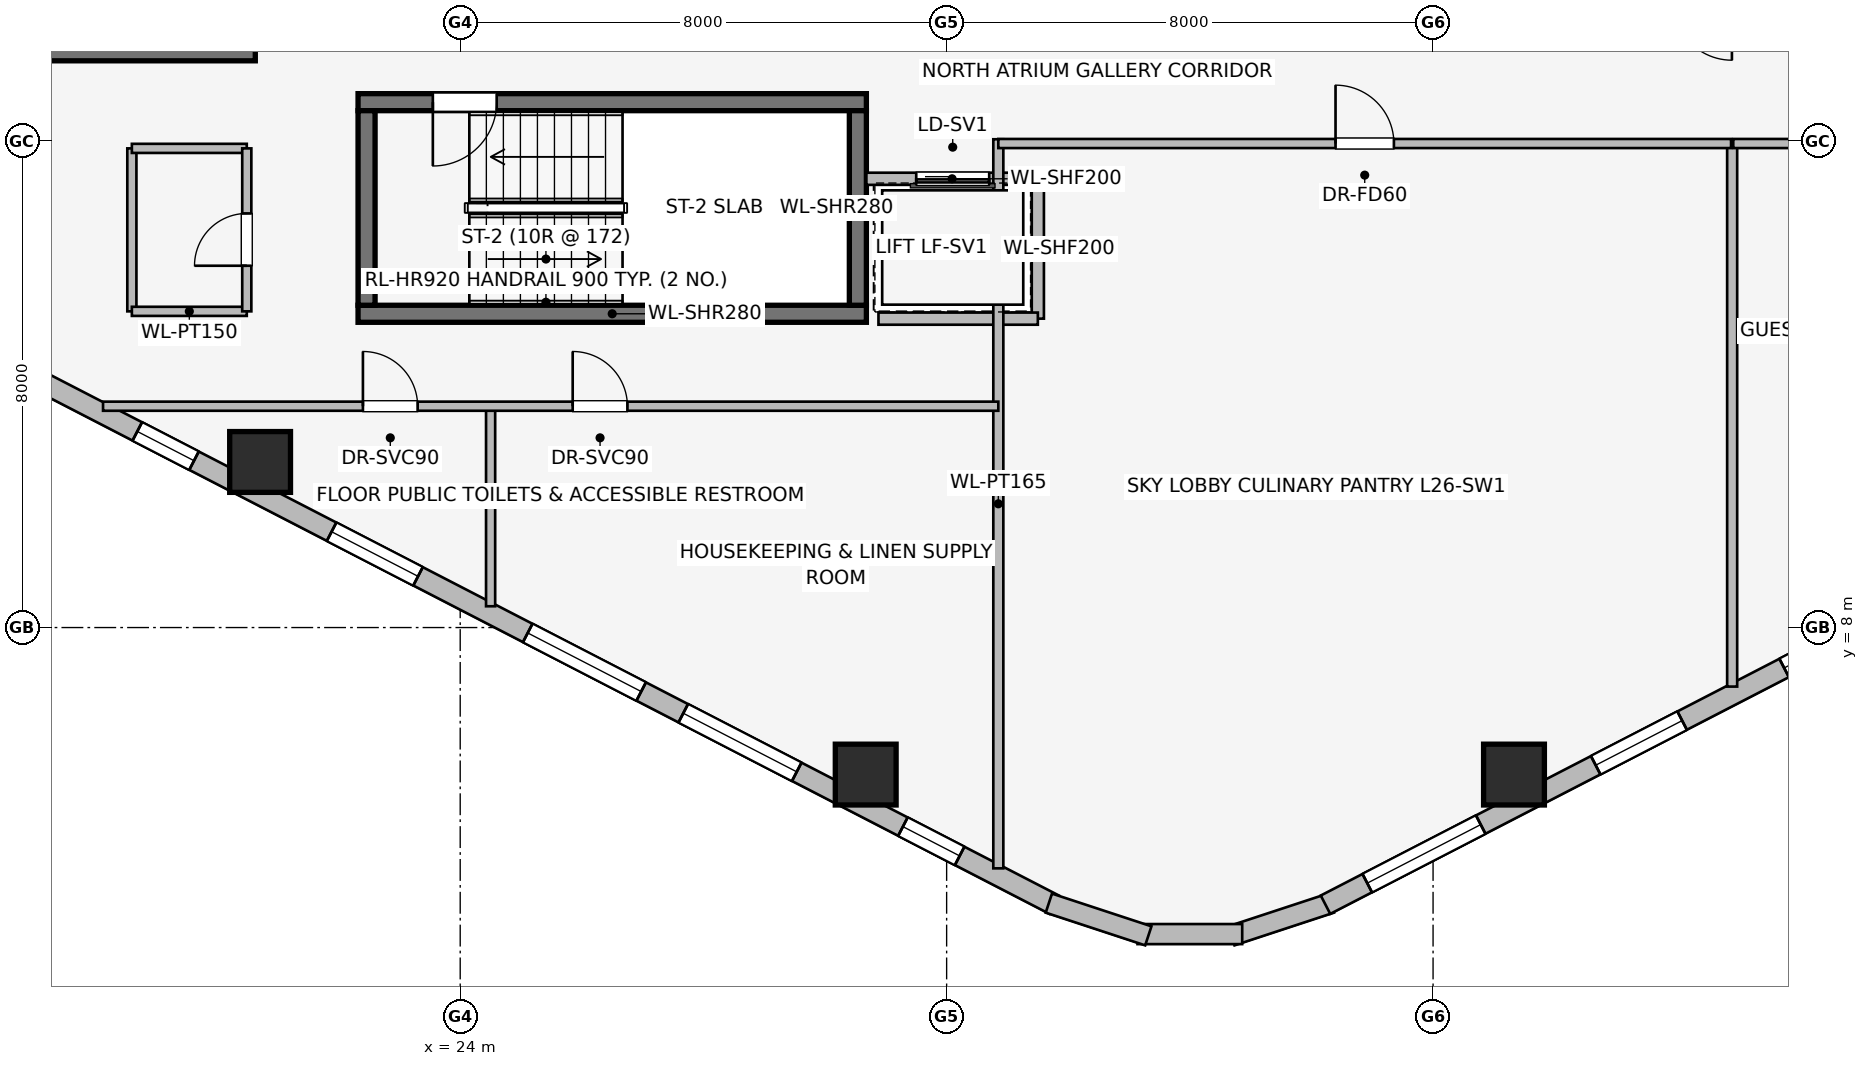
"""IFC4 building model, lengths in metres.
Left out: names, types, materials, properties, quantities, classifications, styles, units other than length and angle.
Written with IfcOpenShell. Run it as: python <this file> out.ifc"""

import sys

from ifc_helpers import new_model, si_unit, direction, frame, frame_2d, origin, origin_2d, place, context, subcontext, project, spatial, rectangle, extrude, element, fill, save


model = new_model("IFC4")
c1 = context("Model", 3, precision=1e-05, world=origin(), true_north=direction((0.0, 1.0)))
c2 = subcontext(c1, "Body", "Model", "MODEL_VIEW")
j1 = project(units=[si_unit("LENGTHUNIT", "METRE"), si_unit("PLANEANGLEUNIT", "RADIAN")], contexts=[c1])
p1 = place(None, origin())
s1 = spatial("IfcSite", under=j1, at=p1, CompositionType="ELEMENT")
p2 = place(p1, origin())
s2 = spatial("IfcBuilding", under=s1, at=p2, CompositionType="ELEMENT")
p3 = place(p2, frame((0.0, 0.0, 101.55)))
s3 = spatial("IfcBuildingStorey", under=s2, at=p3, CompositionType="ELEMENT", Elevation=101.55)
p4 = place(p3, frame((16.87, 17.46, 0.0), z_axis=(0.0, 0.0, 1.0), x_axis=(1.0, 0.0, 0.0)))
e1 = element("IfcWall", 1, at=p4, inside=s3, PredefinedType="SHEAR", context=c2, shape_type="SweptSolid", body=[
    extrude(rectangle(XDim=3.76, YDim=0.28, at=frame_2d((1.88, 0.0))), origin(), (0.0, 0.0, 1.0), 3.45),
])
p5 = place(p3, frame((22.32, 13.16, 0.0), z_axis=(0.0, 0.0, 1.0), x_axis=(1.0, 0.0, 0.0)))
e2 = element("IfcWall", 2, at=p5, inside=s3, PredefinedType="SHEAR", context=c2, shape_type="SweptSolid", body=[
    extrude(rectangle(XDim=8.36, YDim=0.28, at=frame_2d((4.18, 0.0))), origin(), (0.0, 0.0, 1.0), 3.45),
])
p6 = place(p3, frame((30.68, 16.64, 0.0), z_axis=(0.0, 0.0, 1.0), x_axis=(-1.0, 0.0, 0.0)))
e3 = element("IfcWall", 3, at=p6, inside=s3, PredefinedType="SHEAR", context=c2, shape_type="SweptSolid", body=[
    extrude(rectangle(XDim=8.36, YDim=0.28, at=frame_2d((4.18, 0.0))), origin(), (0.0, 0.0, 1.0), 3.45),
])
p7 = place(p6, frame((6.08, 0.0, 0.0)))
e4 = element("IfcOpeningElement", 4, at=p7, cuts=e3, PredefinedType="OPENING", context=c2, shape_type="SweptSolid", body=[
    extrude(rectangle(XDim=1.05, YDim=2.0, at=frame_2d((0.525, 1.0))), frame((0.0, 0.15, 0.0), z_axis=(0.0, -1.0, 0.0), x_axis=(1.0, 0.0, 0.0)), (0.0, 0.0, 1.0), 0.3),
])
for number, where, z_axis, x_axis in (
    (5, (22.46, 16.5, 0.0), (0.0, 0.0, 1.0), (0.0, -1.0, 0.0)),
    (6, (30.54, 13.3, 0.0), (0.0, 0.0, 1.0), (0.0, 1.0, 0.0)),
):
    element("IfcWall", number, at=place(p3, frame(where, z_axis=z_axis, x_axis=x_axis)), inside=s3, PredefinedType="SHEAR", context=c2, shape_type="SweptSolid", body=[
        extrude(rectangle(XDim=3.2, YDim=0.28, at=frame_2d((1.6, 0.0))), origin(), (0.0, 0.0, 1.0), 3.45),
    ])
for number, where, z_axis, x_axis in (
    (7, (20.709, 10.723, 0.0), (0.0, 0.0, 1.0), (1.0, 0.0, 0.0)),
    (8, (30.669, 5.582, 0.0), (0.0, 0.0, 1.0), (1.0, 0.0, 0.0)),
    (9, (41.331, 5.582, 0.0), (0.0, 0.0, 1.0), (1.0, 0.0, 0.0)),
):
    element("IfcColumn", number, at=place(p3, frame(where, z_axis=z_axis, x_axis=x_axis)), inside=s3, PredefinedType="COLUMN", context=c2, shape_type="SweptSolid", body=[
        extrude(rectangle(XDim=1.0, YDim=1.0, at=origin_2d()), origin(), (0.0, 0.0, 1.0), 3.45),
    ])
p8 = place(p3, frame((17.243, 11.95, 0.0), z_axis=(0.0, 0.0, 1.0), x_axis=(-0.790621329885, 0.612305408053, 0.0)))
e10 = element("IfcWall", 10, at=p8, inside=s3, PredefinedType="STANDARD", context=c2, shape_type="SweptSolid", body=[
    extrude(rectangle(XDim=1.676, YDim=0.33, at=frame_2d((0.838, 0.0))), origin(), (0.0, 0.0, 1.0), 3.19),
])
p9 = place(p3, frame((33.769, 3.442, 0.0), z_axis=(0.0, 0.0, 1.0), x_axis=(-0.888613612362, 0.458656568606, 0.0)))
e11 = element("IfcWall", 11, at=p9, inside=s3, PredefinedType="STANDARD", context=c2, shape_type="SweptSolid", body=[
    extrude(rectangle(XDim=18.681, YDim=0.34, at=frame_2d((9.34, 0.0))), origin(), (0.0, 0.0, 1.0), 3.19),
])
p10 = place(p9, frame((1.75, 0.0, 0.75)))
e12 = element("IfcOpeningElement", 12, at=p10, cuts=e11, PredefinedType="OPENING", context=c2, shape_type="SweptSolid", body=[
    extrude(rectangle(XDim=1.05, YDim=1.4, at=frame_2d((0.525, 0.7))), frame((0.0, 0.18, 0.0), z_axis=(0.0, -1.0, 0.0), x_axis=(1.0, 0.0, 0.0)), (0.0, 0.0, 1.0), 0.36),
])
p11 = place(p9, frame((4.765, 0.0, 0.75)))
e13 = element("IfcOpeningElement", 13, at=p11, cuts=e11, PredefinedType="OPENING", context=c2, shape_type="SweptSolid", body=[
    extrude(rectangle(XDim=2.1, YDim=1.5, at=frame_2d((1.05, 0.75))), frame((0.0, 0.18, 0.0), z_axis=(0.0, -1.0, 0.0), x_axis=(1.0, 0.0, 0.0)), (0.0, 0.0, 1.0), 0.36),
])
p12 = place(p9, frame((7.644, 0.0, 0.75)))
e14 = element("IfcOpeningElement", 14, at=p12, cuts=e11, PredefinedType="OPENING", context=c2, shape_type="SweptSolid", body=[
    extrude(rectangle(XDim=2.1, YDim=1.5, at=frame_2d((1.05, 0.75))), frame((0.0, 0.18, 0.0), z_axis=(0.0, -1.0, 0.0), x_axis=(1.0, 0.0, 0.0)), (0.0, 0.0, 1.0), 0.36),
])
p13 = place(p9, frame((11.774, 0.0, 0.75)))
e15 = element("IfcOpeningElement", 15, at=p13, cuts=e11, PredefinedType="OPENING", context=c2, shape_type="SweptSolid", body=[
    extrude(rectangle(XDim=1.6, YDim=1.55, at=frame_2d((0.8, 0.775))), frame((0.0, 0.18, 0.0), z_axis=(0.0, -1.0, 0.0), x_axis=(1.0, 0.0, 0.0)), (0.0, 0.0, 1.0), 0.36),
])
p14 = place(p9, frame((15.92, 0.0, 0.75)))
e16 = element("IfcOpeningElement", 16, at=p14, cuts=e11, PredefinedType="OPENING", context=c2, shape_type="SweptSolid", body=[
    extrude(rectangle(XDim=1.05, YDim=1.4, at=frame_2d((0.525, 0.7))), frame((0.0, 0.18, 0.0), z_axis=(0.0, -1.0, 0.0), x_axis=(1.0, 0.0, 0.0)), (0.0, 0.0, 1.0), 0.36),
])
for number, where, z_axis, x_axis in (
    (17, (38.319, 3.468, 0.0), (0.0, 0.0, 1.0), (-0.95, -0.312, 0.0)),
    (18, (36.861, 2.959, 0.0), (0.0, 0.0, 1.0), (-1.0, 0.0, 0.0)),
    (19, (35.317, 2.93, 0.0), (0.0, 0.0, 1.0), (-0.95, 0.312, 0.0)),
):
    element("IfcWall", number, at=place(p3, frame(where, z_axis=z_axis, x_axis=x_axis)), inside=s3, PredefinedType="STANDARD", context=c2, shape_type="SweptSolid", body=[
        extrude(rectangle(XDim=1.722, YDim=0.33, at=frame_2d((0.861, 0.0))), origin(), (0.0, 0.0, 1.0), 3.19),
    ])
p15 = place(p3, frame((54.831, 12.01, 0.0), z_axis=(0.0, 0.0, 1.0), x_axis=(-0.888613612362, -0.458656568606, 0.0)))
e20 = element("IfcWall", 20, at=p15, inside=s3, PredefinedType="STANDARD", context=c2, shape_type="SweptSolid", body=[
    extrude(rectangle(XDim=18.681, YDim=0.34, at=frame_2d((9.34, 0.0))), origin(), (0.0, 0.0, 1.0), 3.19),
])
p16 = place(p15, frame((1.023, 0.0, 0.75)))
e21 = element("IfcOpeningElement", 21, at=p16, cuts=e20, PredefinedType="OPENING", context=c2, shape_type="SweptSolid", body=[
    extrude(rectangle(XDim=1.6, YDim=1.55, at=frame_2d((0.8, 0.775))), frame((0.0, 0.18, 0.0), z_axis=(0.0, -1.0, 0.0), x_axis=(1.0, 0.0, 0.0)), (0.0, 0.0, 1.0), 0.36),
])
p17 = place(p15, frame((4.914, 0.0, 0.75)))
e22 = element("IfcOpeningElement", 22, at=p17, cuts=e20, PredefinedType="OPENING", context=c2, shape_type="SweptSolid", body=[
    extrude(rectangle(XDim=2.1, YDim=1.5, at=frame_2d((1.05, 0.75))), frame((0.0, 0.18, 0.0), z_axis=(0.0, -1.0, 0.0), x_axis=(1.0, 0.0, 0.0)), (0.0, 0.0, 1.0), 0.36),
])
p18 = place(p15, frame((8.092, 0.0, 0.75)))
e23 = element("IfcOpeningElement", 23, at=p18, cuts=e20, PredefinedType="OPENING", context=c2, shape_type="SweptSolid", body=[
    extrude(rectangle(XDim=2.1, YDim=1.5, at=frame_2d((1.05, 0.75))), frame((0.0, 0.18, 0.0), z_axis=(0.0, -1.0, 0.0), x_axis=(1.0, 0.0, 0.0)), (0.0, 0.0, 1.0), 0.36),
])
p19 = place(p15, frame((12.08, 0.0, 0.75)))
e24 = element("IfcOpeningElement", 24, at=p19, cuts=e20, PredefinedType="OPENING", context=c2, shape_type="SweptSolid", body=[
    extrude(rectangle(XDim=1.6, YDim=1.55, at=frame_2d((0.8, 0.775))), frame((0.0, 0.18, 0.0), z_axis=(0.0, -1.0, 0.0), x_axis=(1.0, 0.0, 0.0)), (0.0, 0.0, 1.0), 0.36),
])
p20 = place(p15, frame((15.808, 0.0, 0.75)))
e25 = element("IfcOpeningElement", 25, at=p20, cuts=e20, PredefinedType="OPENING", context=c2, shape_type="SweptSolid", body=[
    extrude(rectangle(XDim=2.1, YDim=1.5, at=frame_2d((1.05, 0.75))), frame((0.0, 0.18, 0.0), z_axis=(0.0, -1.0, 0.0), x_axis=(1.0, 0.0, 0.0)), (0.0, 0.0, 1.0), 0.36),
])
p21 = place(p3, frame((33.5, 15.38, 0.0), z_axis=(0.0, 0.0, 1.0), x_axis=(-1.0, 0.0, 0.0)))
e26 = element("IfcWall", 26, at=p21, inside=s3, PredefinedType="PARTITIONING", context=c2, shape_type="SweptSolid", body=[
    extrude(rectangle(XDim=2.82, YDim=0.2, at=frame_2d((1.41, 0.0))), origin(), (0.0, 0.0, 1.0), 3.19),
])
p22 = place(p21, frame((0.8, 0.0, 0.0)))
e27 = element("IfcOpeningElement", 27, at=p22, cuts=e26, PredefinedType="OPENING", context=c2, shape_type="SweptSolid", body=[
    extrude(rectangle(XDim=1.2, YDim=2.2, at=frame_2d((0.6, 1.1))), frame((0.0, 0.11, 0.0), z_axis=(0.0, -1.0, 0.0), x_axis=(1.0, 0.0, 0.0)), (0.0, 0.0, 1.0), 0.22),
])
p23 = place(p3, frame((33.5, 13.08, 0.0), z_axis=(0.0, 0.0, 1.0), x_axis=(0.0, 1.0, 0.0)))
e28 = element("IfcWall", 28, at=p23, inside=s3, PredefinedType="PARTITIONING", context=c2, shape_type="SweptSolid", body=[
    extrude(rectangle(XDim=2.3, YDim=0.2, at=frame_2d((1.15, 0.0))), origin(), (0.0, 0.0, 1.0), 3.19),
])
p24 = place(p3, frame((30.879, 13.08, 0.0), z_axis=(0.0, 0.0, 1.0), x_axis=(1.0, 0.0, 0.0)))
e29 = element("IfcWall", 29, at=p24, inside=s3, PredefinedType="PARTITIONING", context=c2, shape_type="SweptSolid", body=[
    extrude(rectangle(XDim=2.621, YDim=0.2, at=frame_2d((1.311, 0.0))), origin(), (0.0, 0.0, 1.0), 3.19),
])
p25 = place(p3, frame((18.6, 15.88, 0.0), z_axis=(0.0, 0.0, 1.0), x_axis=(0.0, -1.0, 0.0)))
e30 = element("IfcWall", 30, at=p25, inside=s3, PredefinedType="PARTITIONING", context=c2, shape_type="SweptSolid", body=[
    extrude(rectangle(XDim=2.68, YDim=0.15, at=frame_2d((1.34, 0.0))), origin(), (0.0, 0.0, 1.0), 3.19),
])
for number, where, z_axis, x_axis in (
    (31, (18.6, 13.2, 0.0), (0.0, 0.0, 1.0), (1.0, 0.0, 0.0)),
    (32, (18.6, 15.88, 0.0), (0.0, 0.0, 1.0), (1.0, 0.0, 0.0)),
):
    element("IfcWall", number, at=place(p3, frame(where, z_axis=z_axis, x_axis=x_axis)), inside=s3, PredefinedType="PARTITIONING", context=c2, shape_type="SweptSolid", body=[
        extrude(rectangle(XDim=1.89, YDim=0.15, at=frame_2d((0.945, 0.0))), origin(), (0.0, 0.0, 1.0), 3.19),
    ])
p26 = place(p3, frame((20.49, 13.2, 0.0), z_axis=(0.0, 0.0, 1.0), x_axis=(0.0, 1.0, 0.0)))
e33 = element("IfcWall", 33, at=p26, inside=s3, PredefinedType="PARTITIONING", context=c2, shape_type="SweptSolid", body=[
    extrude(rectangle(XDim=2.68, YDim=0.15, at=frame_2d((1.34, 0.0))), origin(), (0.0, 0.0, 1.0), 3.19),
])
p27 = place(p26, frame((0.75, 0.0, 0.0)))
e34 = element("IfcOpeningElement", 34, at=p27, cuts=e33, PredefinedType="OPENING", context=c2, shape_type="SweptSolid", body=[
    extrude(rectangle(XDim=0.86, YDim=2.0, at=frame_2d((0.43, 1.0))), frame((0.0, 0.085, 0.0), z_axis=(0.0, -1.0, 0.0), x_axis=(1.0, 0.0, 0.0)), (0.0, 0.0, 1.0), 0.17),
])
p28 = place(p3, frame((32.85, 4.04, 0.0), z_axis=(0.0, 0.0, 1.0), x_axis=(0.0, 1.0, 0.0)))
e35 = element("IfcWall", 35, at=p28, inside=s3, PredefinedType="PARTITIONING", context=c2, shape_type="SweptSolid", body=[
    extrude(rectangle(XDim=11.99, YDim=0.165, at=frame_2d((5.995, 0.0))), origin(), (0.0, 0.0, 1.0), 3.19),
])
p29 = place(p3, frame((24.5, 8.35, 0.0), z_axis=(0.0, 0.0, 1.0), x_axis=(0.0, 1.0, 0.0)))
e36 = element("IfcWall", 36, at=p29, inside=s3, PredefinedType="PARTITIONING", context=c2, shape_type="SweptSolid", body=[
    extrude(rectangle(XDim=3.29, YDim=0.15, at=frame_2d((1.645, 0.0))), origin(), (0.0, 0.0, 1.0), 3.19),
])
p30 = place(p3, frame((18.126, 11.64, 0.0), z_axis=(0.0, 0.0, 1.0), x_axis=(1.0, 0.0, 0.0)))
e37 = element("IfcWall", 37, at=p30, inside=s3, PredefinedType="PARTITIONING", context=c2, shape_type="SweptSolid", body=[
    extrude(rectangle(XDim=14.724, YDim=0.15, at=frame_2d((7.362, 0.0))), origin(), (0.0, 0.0, 1.0), 3.19),
])
p31 = place(p30, frame((4.274, 0.0, 0.0)))
e38 = element("IfcOpeningElement", 38, at=p31, cuts=e37, PredefinedType="OPENING", context=c2, shape_type="SweptSolid", body=[
    extrude(rectangle(XDim=0.9, YDim=2.0, at=frame_2d((0.45, 1.0))), frame((0.0, 0.085, 0.0), z_axis=(0.0, -1.0, 0.0), x_axis=(1.0, 0.0, 0.0)), (0.0, 0.0, 1.0), 0.17),
])
p32 = place(p30, frame((7.724, 0.0, 0.0)))
e39 = element("IfcOpeningElement", 39, at=p32, cuts=e37, PredefinedType="OPENING", context=c2, shape_type="SweptSolid", body=[
    extrude(rectangle(XDim=0.9, YDim=2.0, at=frame_2d((0.45, 1.0))), frame((0.0, 0.085, 0.0), z_axis=(0.0, -1.0, 0.0), x_axis=(1.0, 0.0, 0.0)), (0.0, 0.0, 1.0), 0.17),
])
p33 = place(p3, frame((44.919, 7.029, 0.0), z_axis=(0.0, 0.0, 1.0), x_axis=(0.0, 1.0, 0.0)))
e40 = element("IfcWall", 40, at=p33, inside=s3, PredefinedType="PARTITIONING", context=c2, shape_type="SweptSolid", body=[
    extrude(rectangle(XDim=8.901, YDim=0.165, at=frame_2d((4.45, 0.0))), origin(), (0.0, 0.0, 1.0), 3.19),
])
p34 = place(p3, frame((32.85, 15.96, 0.0), z_axis=(0.0, 0.0, 1.0), x_axis=(1.0, 0.0, 0.0)))
e41 = element("IfcWall", 41, at=p34, inside=s3, PredefinedType="PARTITIONING", context=c2, shape_type="SweptSolid", body=[
    extrude(rectangle(XDim=12.051, YDim=0.15, at=frame_2d((6.025, 0.0))), origin(), (0.0, 0.0, 1.0), 3.19),
])
p35 = place(p34, frame((5.546, 0.0, 0.0)))
e42 = element("IfcOpeningElement", 42, at=p35, cuts=e41, PredefinedType="OPENING", context=c2, shape_type="SweptSolid", body=[
    extrude(rectangle(XDim=0.96, YDim=2.0, at=frame_2d((0.48, 1.0))), frame((0.0, 0.085, 0.0), z_axis=(0.0, -1.0, 0.0), x_axis=(1.0, 0.0, 0.0)), (0.0, 0.0, 1.0), 0.17),
])
p36 = place(p3, frame((44.937, 15.96, 0.0), z_axis=(0.0, 0.0, 1.0), x_axis=(1.0, 0.0, 0.0)))
e43 = element("IfcWall", 43, at=p36, inside=s3, PredefinedType="PARTITIONING", context=c2, shape_type="SweptSolid", body=[
    extrude(rectangle(XDim=12.271, YDim=0.15, at=frame_2d((6.135, 0.0))), origin(), (0.0, 0.0, 1.0), 3.19),
])
p37 = place(p36, frame((5.669, 0.0, 0.0)))
e44 = element("IfcOpeningElement", 44, at=p37, cuts=e43, PredefinedType="OPENING", context=c2, shape_type="SweptSolid", body=[
    extrude(rectangle(XDim=0.96, YDim=2.0, at=frame_2d((0.48, 1.0))), frame((0.0, 0.085, 0.0), z_axis=(0.0, -1.0, 0.0), x_axis=(1.0, 0.0, 0.0)), (0.0, 0.0, 1.0), 0.17),
])
p38 = place(p10, origin())
e45 = element("IfcWindow", 45, at=p38, inside=s3, PartitioningType="SINGLE_PANEL", PredefinedType="WINDOW", context=c2, shape_type="SweptSolid", body=[
    extrude(rectangle(XDim=1.05, YDim=1.4, at=frame_2d((0.525, 0.7))), frame((0.0, 0.03, 0.0), z_axis=(0.0, -1.0, 0.0), x_axis=(1.0, 0.0, 0.0)), (0.0, 0.0, 1.0), 0.06),
])
fill(e12, e45)
p39 = place(p11, origin())
e46 = element("IfcWindow", 46, at=p39, inside=s3, PartitioningType="SINGLE_PANEL", PredefinedType="WINDOW", context=c2, shape_type="SweptSolid", body=[
    extrude(rectangle(XDim=2.1, YDim=1.5, at=frame_2d((1.05, 0.75))), frame((0.0, 0.03, 0.0), z_axis=(0.0, -1.0, 0.0), x_axis=(1.0, 0.0, 0.0)), (0.0, 0.0, 1.0), 0.06),
])
fill(e13, e46)
p40 = place(p12, origin())
e47 = element("IfcWindow", 47, at=p40, inside=s3, PartitioningType="SINGLE_PANEL", PredefinedType="WINDOW", context=c2, shape_type="SweptSolid", body=[
    extrude(rectangle(XDim=2.1, YDim=1.5, at=frame_2d((1.05, 0.75))), frame((0.0, 0.03, 0.0), z_axis=(0.0, -1.0, 0.0), x_axis=(1.0, 0.0, 0.0)), (0.0, 0.0, 1.0), 0.06),
])
fill(e14, e47)
p41 = place(p13, origin())
e48 = element("IfcWindow", 48, at=p41, inside=s3, PartitioningType="SINGLE_PANEL", PredefinedType="WINDOW", context=c2, shape_type="SweptSolid", body=[
    extrude(rectangle(XDim=1.6, YDim=1.55, at=frame_2d((0.8, 0.775))), frame((0.0, 0.03, 0.0), z_axis=(0.0, -1.0, 0.0), x_axis=(1.0, 0.0, 0.0)), (0.0, 0.0, 1.0), 0.06),
])
fill(e15, e48)
p42 = place(p14, origin())
e49 = element("IfcWindow", 49, at=p42, inside=s3, PartitioningType="SINGLE_PANEL", PredefinedType="WINDOW", context=c2, shape_type="SweptSolid", body=[
    extrude(rectangle(XDim=1.05, YDim=1.4, at=frame_2d((0.525, 0.7))), frame((0.0, 0.03, 0.0), z_axis=(0.0, -1.0, 0.0), x_axis=(1.0, 0.0, 0.0)), (0.0, 0.0, 1.0), 0.06),
])
fill(e16, e49)
p43 = place(p18, origin())
e50 = element("IfcWindow", 50, at=p43, inside=s3, PartitioningType="SINGLE_PANEL", PredefinedType="WINDOW", context=c2, shape_type="SweptSolid", body=[
    extrude(rectangle(XDim=2.1, YDim=1.5, at=frame_2d((1.05, 0.75))), frame((0.0, 0.03, 0.0), z_axis=(0.0, -1.0, 0.0), x_axis=(1.0, 0.0, 0.0)), (0.0, 0.0, 1.0), 0.06),
])
fill(e23, e50)
p44 = place(p19, origin())
e51 = element("IfcWindow", 51, at=p44, inside=s3, PartitioningType="SINGLE_PANEL", PredefinedType="WINDOW", context=c2, shape_type="SweptSolid", body=[
    extrude(rectangle(XDim=1.6, YDim=1.55, at=frame_2d((0.8, 0.775))), frame((0.0, 0.03, 0.0), z_axis=(0.0, -1.0, 0.0), x_axis=(1.0, 0.0, 0.0)), (0.0, 0.0, 1.0), 0.06),
])
fill(e24, e51)
p45 = place(p20, origin())
e52 = element("IfcWindow", 52, at=p45, inside=s3, PartitioningType="SINGLE_PANEL", PredefinedType="WINDOW", context=c2, shape_type="SweptSolid", body=[
    extrude(rectangle(XDim=2.1, YDim=1.5, at=frame_2d((1.05, 0.75))), frame((0.0, 0.03, 0.0), z_axis=(0.0, -1.0, 0.0), x_axis=(1.0, 0.0, 0.0)), (0.0, 0.0, 1.0), 0.06),
])
fill(e25, e52)
p46 = place(p7, origin())
e53 = element("IfcDoor", 53, at=p46, inside=s3, OperationType="SINGLE_SWING_RIGHT", PredefinedType="DOOR", context=c2, shape_type="SweptSolid", body=[
    extrude(rectangle(XDim=1.05, YDim=2.0, at=frame_2d((0.525, 1.0))), frame((0.0, 0.025, 0.0), z_axis=(0.0, -1.0, 0.0), x_axis=(1.0, 0.0, 0.0)), (0.0, 0.0, 1.0), 0.05),
])
fill(e4, e53)
p47 = place(p22, origin())
e54 = element("IfcDoor", 54, at=p47, inside=s3, OperationType="SLIDING_TO_RIGHT", PredefinedType="DOOR", context=c2, shape_type="SweptSolid", body=[
    extrude(rectangle(XDim=1.2, YDim=2.2, at=frame_2d((0.6, 1.1))), frame((0.0, 0.025, 0.0), z_axis=(0.0, -1.0, 0.0), x_axis=(1.0, 0.0, 0.0)), (0.0, 0.0, 1.0), 0.05),
])
fill(e27, e54)
p48 = place(p27, origin())
e55 = element("IfcDoor", 55, at=p48, inside=s3, OperationType="SINGLE_SWING_LEFT", PredefinedType="DOOR", context=c2, shape_type="SweptSolid", body=[
    extrude(rectangle(XDim=0.86, YDim=2.0, at=frame_2d((0.43, 1.0))), frame((0.0, 0.025, 0.0), z_axis=(0.0, -1.0, 0.0), x_axis=(1.0, 0.0, 0.0)), (0.0, 0.0, 1.0), 0.05),
])
fill(e34, e55)
p49 = place(p31, origin())
e56 = element("IfcDoor", 56, at=p49, inside=s3, OperationType="SINGLE_SWING_LEFT", PredefinedType="DOOR", context=c2, shape_type="SweptSolid", body=[
    extrude(rectangle(XDim=0.9, YDim=2.0, at=frame_2d((0.45, 1.0))), frame((0.0, 0.025, 0.0), z_axis=(0.0, -1.0, 0.0), x_axis=(1.0, 0.0, 0.0)), (0.0, 0.0, 1.0), 0.05),
])
fill(e38, e56)
p50 = place(p32, origin())
e57 = element("IfcDoor", 57, at=p50, inside=s3, OperationType="SINGLE_SWING_LEFT", PredefinedType="DOOR", context=c2, shape_type="SweptSolid", body=[
    extrude(rectangle(XDim=0.9, YDim=2.0, at=frame_2d((0.45, 1.0))), frame((0.0, 0.025, 0.0), z_axis=(0.0, -1.0, 0.0), x_axis=(1.0, 0.0, 0.0)), (0.0, 0.0, 1.0), 0.05),
])
fill(e39, e57)
p51 = place(p35, origin())
e58 = element("IfcDoor", 58, at=p51, inside=s3, OperationType="SINGLE_SWING_LEFT", PredefinedType="DOOR", context=c2, shape_type="SweptSolid", body=[
    extrude(rectangle(XDim=0.96, YDim=2.0, at=frame_2d((0.48, 1.0))), frame((0.0, 0.025, 0.0), z_axis=(0.0, -1.0, 0.0), x_axis=(1.0, 0.0, 0.0)), (0.0, 0.0, 1.0), 0.05),
])
fill(e42, e58)
save(model, sys.argv[1])
